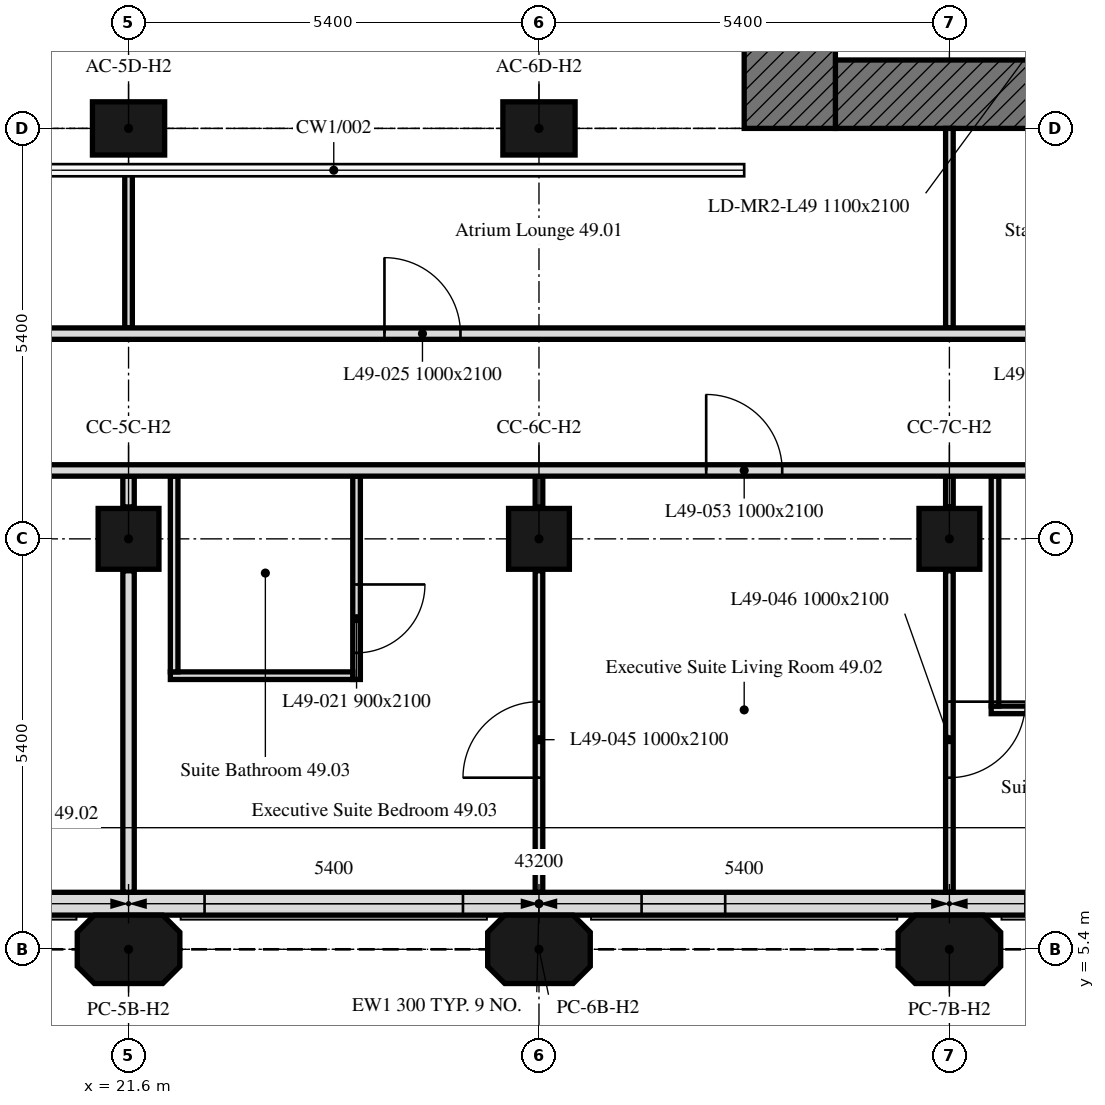
"""IFC4 building model, lengths in metres.
Left out: names, types, materials, properties, quantities, classifications, styles, units other than length and angle.
Written with IfcOpenShell. Run it as: python <this file> out.ifc"""

import sys

from ifc_helpers import new_model, si_unit, direction, frame, frame_2d, origin, origin_2d, place, context, subcontext, project, spatial, polyline, rectangle, outline, extrude, element, fill, save


model = new_model("IFC4")
c1 = context("Model", 3, precision=1e-05, world=origin(), true_north=direction((0.0, 1.0)))
c2 = subcontext(c1, "Body", "Model", "MODEL_VIEW")
j1 = project(units=[si_unit("LENGTHUNIT", "METRE"), si_unit("PLANEANGLEUNIT", "RADIAN")], contexts=[c1])
p1 = place(None, origin())
s1 = spatial("IfcSite", under=j1, at=p1, CompositionType="ELEMENT")
p2 = place(p1, origin())
s2 = spatial("IfcBuilding", under=s1, at=p2, CompositionType="ELEMENT")
p3 = place(p2, frame((0.0, 0.0, 200.5)))
s3 = spatial("IfcBuildingStorey", under=s2, at=p3, CompositionType="ELEMENT", Elevation=200.5)
for number, where, z_axis, x_axis in (
    (1, (21.6, 5.4, 0.0), (0.0, 0.0, 1.0), (1.0, 0.0, 0.0)),
    (2, (27.0, 5.4, 0.0), (0.0, 0.0, 1.0), (1.0, 0.0, 0.0)),
    (3, (32.4, 5.4, 0.0), (0.0, 0.0, 1.0), (1.0, 0.0, 0.0)),
):
    element("IfcColumn", number, at=place(p3, frame(where, z_axis=z_axis, x_axis=x_axis)), inside=s3, PredefinedType="COLUMN", context=c2, shape_type="SweptSolid", body=[
        extrude(outline(polyline([(-0.45, -0.45), (0.45, -0.45), (0.675, -0.225), (0.675, 0.225), (0.45, 0.45), (-0.45, 0.45), (-0.675, 0.225), (-0.675, -0.225), (-0.45, -0.45)])), origin(), (0.0, 0.0, 1.0), 3.0),
    ])
for number, where, z_axis, x_axis in (
    (4, (21.6, 10.8, 0.0), (0.0, 0.0, 1.0), (1.0, 0.0, 0.0)),
    (5, (27.0, 10.8, 0.0), (0.0, 0.0, 1.0), (1.0, 0.0, 0.0)),
    (6, (32.4, 10.8, 0.0), (0.0, 0.0, 1.0), (1.0, 0.0, 0.0)),
):
    element("IfcColumn", number, at=place(p3, frame(where, z_axis=z_axis, x_axis=x_axis)), inside=s3, PredefinedType="COLUMN", context=c2, shape_type="SweptSolid", body=[
        extrude(rectangle(XDim=0.8, YDim=0.8, at=origin_2d()), origin(), (0.0, 0.0, 1.0), 3.0),
    ])
for number, where, z_axis, x_axis in (
    (7, (21.6, 16.2, 0.0), (0.0, 0.0, 1.0), (1.0, 0.0, 0.0)),
    (8, (27.0, 16.2, 0.0), (0.0, 0.0, 1.0), (1.0, 0.0, 0.0)),
):
    element("IfcColumn", number, at=place(p3, frame(where, z_axis=z_axis, x_axis=x_axis)), inside=s3, PredefinedType="COLUMN", context=c2, shape_type="SweptSolid", body=[
        extrude(rectangle(XDim=0.95, YDim=0.7, at=origin_2d()), origin(), (0.0, 0.0, 1.0), 3.0),
    ])
p4 = place(p3, frame((10.986, 6.0, 0.0), z_axis=(0.0, 0.0, 1.0), x_axis=(1.0, 0.0, 0.0)))
e9 = element("IfcWall", 9, at=p4, inside=s3, PredefinedType="SOLIDWALL", context=c2, shape_type="SweptSolid", body=[
    extrude(rectangle(XDim=32.027, YDim=0.3, at=frame_2d((16.014, 0.0))), origin(), (0.0, 0.0, 1.0), 3.0),
])
p5 = place(p4, frame((0.814, 0.0, 0.9)))
e10 = element("IfcOpeningElement", 10, at=p5, cuts=e9, PredefinedType="OPENING", context=c2, shape_type="SweptSolid", body=[
    extrude(rectangle(XDim=3.4, YDim=1.7, at=frame_2d((1.7, 0.85))), frame((0.0, 0.16, 0.0), z_axis=(0.0, -1.0, 0.0), x_axis=(1.0, 0.0, 0.0)), (0.0, 0.0, 1.0), 0.32),
])
p6 = place(p4, frame((6.564, 0.0, 0.9)))
e11 = element("IfcOpeningElement", 11, at=p6, cuts=e9, PredefinedType="OPENING", context=c2, shape_type="SweptSolid", body=[
    extrude(rectangle(XDim=1.1, YDim=1.7, at=frame_2d((0.55, 0.85))), frame((0.0, 0.16, 0.0), z_axis=(0.0, -1.0, 0.0), x_axis=(1.0, 0.0, 0.0)), (0.0, 0.0, 1.0), 0.32),
])
p7 = place(p4, frame((11.614, 0.0, 0.9)))
e12 = element("IfcOpeningElement", 12, at=p7, cuts=e9, PredefinedType="OPENING", context=c2, shape_type="SweptSolid", body=[
    extrude(rectangle(XDim=3.4, YDim=1.7, at=frame_2d((1.7, 0.85))), frame((0.0, 0.16, 0.0), z_axis=(0.0, -1.0, 0.0), x_axis=(1.0, 0.0, 0.0)), (0.0, 0.0, 1.0), 0.32),
])
p8 = place(p4, frame((17.364, 0.0, 0.9)))
e13 = element("IfcOpeningElement", 13, at=p8, cuts=e9, PredefinedType="OPENING", context=c2, shape_type="SweptSolid", body=[
    extrude(rectangle(XDim=1.1, YDim=1.7, at=frame_2d((0.55, 0.85))), frame((0.0, 0.16, 0.0), z_axis=(0.0, -1.0, 0.0), x_axis=(1.0, 0.0, 0.0)), (0.0, 0.0, 1.0), 0.32),
])
p9 = place(p4, frame((22.414, 0.0, 0.9)))
e14 = element("IfcOpeningElement", 14, at=p9, cuts=e9, PredefinedType="OPENING", context=c2, shape_type="SweptSolid", body=[
    extrude(rectangle(XDim=3.4, YDim=1.7, at=frame_2d((1.7, 0.85))), frame((0.0, 0.16, 0.0), z_axis=(0.0, -1.0, 0.0), x_axis=(1.0, 0.0, 0.0)), (0.0, 0.0, 1.0), 0.32),
])
p10 = place(p4, frame((28.164, 0.0, 0.9)))
e15 = element("IfcOpeningElement", 15, at=p10, cuts=e9, PredefinedType="OPENING", context=c2, shape_type="SweptSolid", body=[
    extrude(rectangle(XDim=1.1, YDim=1.7, at=frame_2d((0.55, 0.85))), frame((0.0, 0.16, 0.0), z_axis=(0.0, -1.0, 0.0), x_axis=(1.0, 0.0, 0.0)), (0.0, 0.0, 1.0), 0.32),
])
p11 = place(p3, frame((42.0, 16.65, 0.0), z_axis=(0.0, 0.0, 1.0), x_axis=(-1.0, 0.0, 0.0)))
e16 = element("IfcWall", 16, at=p11, inside=s3, PredefinedType="SOLIDWALL", context=c2, shape_type="SweptSolid", body=[
    extrude(rectangle(XDim=11.1, YDim=0.9, at=frame_2d((5.55, 0.0))), origin(), (0.0, 0.0, 1.0), 3.0),
])
p12 = place(p11, frame((3.55, 0.0, 0.0)))
e17 = element("IfcOpeningElement", 17, at=p12, cuts=e16, PredefinedType="OPENING", context=c2, shape_type="SweptSolid", body=[
    extrude(rectangle(XDim=2.0, YDim=2.4, at=frame_2d((1.0, 1.2))), frame((0.0, 0.45, 0.0), z_axis=(0.0, -1.0, 0.0), x_axis=(1.0, 0.0, 0.0)), (0.0, 0.0, 1.0), 0.9),
])
p13 = place(p3, frame((30.3, 16.2, 0.0), z_axis=(0.0, 0.0, 1.0), x_axis=(0.0, 1.0, 0.0)))
e18 = element("IfcWall", 18, at=p13, inside=s3, PredefinedType="SOLIDWALL", context=c2, shape_type="SweptSolid", body=[
    extrude(rectangle(XDim=16.2, YDim=1.2, at=frame_2d((8.1, 0.0))), origin(), (0.0, 0.0, 1.0), 3.0),
])
p14 = place(p3, frame((21.6, 6.151, 0.0), z_axis=(0.0, 0.0, 1.0), x_axis=(0.0, 1.0, 0.0)))
e19 = element("IfcWall", 19, at=p14, inside=s3, PredefinedType="PARTITIONING", context=c2, shape_type="SweptSolid", body=[
    extrude(rectangle(XDim=4.229, YDim=0.15, at=frame_2d((2.115, 0.0))), origin(), (0.0, 0.0, 1.0), 3.0),
])
p15 = place(p3, frame((21.6, 11.22, 0.0), z_axis=(0.0, 0.0, 1.0), x_axis=(0.0, 1.0, 0.0)))
e20 = element("IfcWall", 20, at=p15, inside=s3, PredefinedType="PARTITIONING", context=c2, shape_type="SweptSolid", body=[
    extrude(rectangle(XDim=0.405, YDim=0.15, at=frame_2d((0.203, 0.0))), origin(), (0.0, 0.0, 1.0), 3.0),
])
p16 = place(p3, frame((27.0, 6.151, 0.0), z_axis=(0.0, 0.0, 1.0), x_axis=(0.0, 1.0, 0.0)))
e21 = element("IfcWall", 21, at=p16, inside=s3, PredefinedType="PARTITIONING", context=c2, shape_type="SweptSolid", body=[
    extrude(rectangle(XDim=4.229, YDim=0.1, at=frame_2d((2.115, 0.0))), origin(), (0.0, 0.0, 1.0), 3.0),
])
p17 = place(p16, frame((1.507, 0.0, 0.0)))
e22 = element("IfcOpeningElement", 22, at=p17, cuts=e21, PredefinedType="OPENING", context=c2, shape_type="SweptSolid", body=[
    extrude(rectangle(XDim=1.0, YDim=2.1, at=frame_2d((0.5, 1.05))), frame((0.0, 0.05, 0.0), z_axis=(0.0, -1.0, 0.0), x_axis=(1.0, 0.0, 0.0)), (0.0, 0.0, 1.0), 0.1),
])
p18 = place(p3, frame((27.0, 11.22, 0.0), z_axis=(0.0, 0.0, 1.0), x_axis=(0.0, 1.0, 0.0)))
e23 = element("IfcWall", 23, at=p18, inside=s3, PredefinedType="PARTITIONING", context=c2, shape_type="SweptSolid", body=[
    extrude(rectangle(XDim=0.405, YDim=0.1, at=frame_2d((0.203, 0.0))), origin(), (0.0, 0.0, 1.0), 3.0),
])
p19 = place(p3, frame((24.6, 11.625, 0.0), z_axis=(0.0, 0.0, 1.0), x_axis=(0.0, -1.0, 0.0)))
e24 = element("IfcWall", 24, at=p19, inside=s3, PredefinedType="PARTITIONING", context=c2, shape_type="SweptSolid", body=[
    extrude(rectangle(XDim=2.675, YDim=0.1, at=frame_2d((1.337, 0.0))), origin(), (0.0, 0.0, 1.0), 3.0),
])
p20 = place(p19, frame((1.425, 0.0, 0.0)))
e25 = element("IfcOpeningElement", 25, at=p20, cuts=e24, PredefinedType="OPENING", context=c2, shape_type="SweptSolid", body=[
    extrude(rectangle(XDim=0.9, YDim=2.1, at=frame_2d((0.45, 1.05))), frame((0.0, 0.05, 0.0), z_axis=(0.0, -1.0, 0.0), x_axis=(1.0, 0.0, 0.0)), (0.0, 0.0, 1.0), 0.1),
])
p21 = place(p3, frame((24.55, 9.0, 0.0), z_axis=(0.0, 0.0, 1.0), x_axis=(-1.0, 0.0, 0.0)))
e26 = element("IfcWall", 26, at=p21, inside=s3, PredefinedType="PARTITIONING", context=c2, shape_type="SweptSolid", body=[
    extrude(rectangle(XDim=2.4, YDim=0.1, at=frame_2d((1.2, 0.0))), origin(), (0.0, 0.0, 1.0), 3.0),
])
p22 = place(p3, frame((22.2, 9.05, 0.0), z_axis=(0.0, 0.0, 1.0), x_axis=(0.0, 1.0, 0.0)))
e27 = element("IfcWall", 27, at=p22, inside=s3, PredefinedType="PARTITIONING", context=c2, shape_type="SweptSolid", body=[
    extrude(rectangle(XDim=2.575, YDim=0.1, at=frame_2d((1.288, 0.0))), origin(), (0.0, 0.0, 1.0), 3.0),
])
p23 = place(p3, frame((35.35, 8.55, 0.0), z_axis=(0.0, 0.0, 1.0), x_axis=(-1.0, 0.0, 0.0)))
e28 = element("IfcWall", 28, at=p23, inside=s3, PredefinedType="PARTITIONING", context=c2, shape_type="SweptSolid", body=[
    extrude(rectangle(XDim=2.4, YDim=0.1, at=frame_2d((1.2, 0.0))), origin(), (0.0, 0.0, 1.0), 3.0),
])
p24 = place(p3, frame((33.0, 8.6, 0.0), z_axis=(0.0, 0.0, 1.0), x_axis=(0.0, 1.0, 0.0)))
e29 = element("IfcWall", 29, at=p24, inside=s3, PredefinedType="PARTITIONING", context=c2, shape_type="SweptSolid", body=[
    extrude(rectangle(XDim=3.025, YDim=0.1, at=frame_2d((1.512, 0.0))), origin(), (0.0, 0.0, 1.0), 3.0),
])
p25 = place(p3, frame((32.4, 11.625, 0.0), z_axis=(0.0, 0.0, 1.0), x_axis=(0.0, -1.0, 0.0)))
e30 = element("IfcWall", 30, at=p25, inside=s3, PredefinedType="PARTITIONING", context=c2, shape_type="SweptSolid", body=[
    extrude(rectangle(XDim=0.405, YDim=0.1, at=frame_2d((0.203, 0.0))), origin(), (0.0, 0.0, 1.0), 3.0),
])
p26 = place(p3, frame((32.4, 10.38, 0.0), z_axis=(0.0, 0.0, 1.0), x_axis=(0.0, -1.0, 0.0)))
e31 = element("IfcWall", 31, at=p26, inside=s3, PredefinedType="PARTITIONING", context=c2, shape_type="SweptSolid", body=[
    extrude(rectangle(XDim=4.229, YDim=0.1, at=frame_2d((2.115, 0.0))), origin(), (0.0, 0.0, 1.0), 3.0),
])
p27 = place(p26, frame((1.722, 0.0, 0.0)))
e32 = element("IfcOpeningElement", 32, at=p27, cuts=e31, PredefinedType="OPENING", context=c2, shape_type="SweptSolid", body=[
    extrude(rectangle(XDim=1.0, YDim=2.1, at=frame_2d((0.5, 1.05))), frame((0.0, 0.05, 0.0), z_axis=(0.0, -1.0, 0.0), x_axis=(1.0, 0.0, 0.0)), (0.0, 0.0, 1.0), 0.1),
])
p28 = place(p3, frame((6.151, 11.7, 0.0), z_axis=(0.0, 0.0, 1.0), x_axis=(1.0, 0.0, 0.0)))
e33 = element("IfcWall", 33, at=p28, inside=s3, PredefinedType="PARTITIONING", context=c2, shape_type="SweptSolid", body=[
    extrude(rectangle(XDim=41.698, YDim=0.15, at=frame_2d((20.849, 0.0))), origin(), (0.0, 0.0, 1.0), 3.0),
])
p29 = place(p28, frame((37.954, 0.0, 0.0)))
e34 = element("IfcOpeningElement", 34, at=p29, cuts=e33, PredefinedType="OPENING", context=c2, shape_type="SweptSolid", body=[
    extrude(rectangle(XDim=1.0, YDim=2.1, at=frame_2d((0.5, 1.05))), frame((0.0, 0.075, 0.0), z_axis=(0.0, -1.0, 0.0), x_axis=(1.0, 0.0, 0.0)), (0.0, 0.0, 1.0), 0.15),
])
p30 = place(p28, frame((6.849, 0.0, 0.0)))
e35 = element("IfcOpeningElement", 35, at=p30, cuts=e33, PredefinedType="OPENING", context=c2, shape_type="SweptSolid", body=[
    extrude(rectangle(XDim=1.0, YDim=2.1, at=frame_2d((0.5, 1.05))), frame((0.0, 0.075, 0.0), z_axis=(0.0, -1.0, 0.0), x_axis=(1.0, 0.0, 0.0)), (0.0, 0.0, 1.0), 0.15),
])
p31 = place(p28, frame((23.049, 0.0, 0.0)))
e36 = element("IfcOpeningElement", 36, at=p31, cuts=e33, PredefinedType="OPENING", context=c2, shape_type="SweptSolid", body=[
    extrude(rectangle(XDim=1.0, YDim=2.1, at=frame_2d((0.5, 1.05))), frame((0.0, 0.075, 0.0), z_axis=(0.0, -1.0, 0.0), x_axis=(1.0, 0.0, 0.0)), (0.0, 0.0, 1.0), 0.15),
])
p32 = place(p3, frame((21.6, 13.575, 0.0), z_axis=(0.0, 0.0, 1.0), x_axis=(0.0, 1.0, 0.0)))
e37 = element("IfcWall", 37, at=p32, inside=s3, PredefinedType="PARTITIONING", context=c2, shape_type="SweptSolid", body=[
    extrude(rectangle(XDim=2.13, YDim=0.1, at=frame_2d((1.065, 0.0))), origin(), (0.0, 0.0, 1.0), 3.0),
])
p33 = place(p3, frame((32.4, 13.575, 0.0), z_axis=(0.0, 0.0, 1.0), x_axis=(0.0, 1.0, 0.0)))
e38 = element("IfcWall", 38, at=p33, inside=s3, PredefinedType="PARTITIONING", context=c2, shape_type="SweptSolid", body=[
    extrude(rectangle(XDim=2.625, YDim=0.1, at=frame_2d((1.312, 0.0))), origin(), (0.0, 0.0, 1.0), 3.0),
])
p34 = place(p3, frame((6.151, 13.5, 0.0), z_axis=(0.0, 0.0, 1.0), x_axis=(1.0, 0.0, 0.0)))
e39 = element("IfcWall", 39, at=p34, inside=s3, PredefinedType="PARTITIONING", context=c2, shape_type="SweptSolid", body=[
    extrude(rectangle(XDim=36.974, YDim=0.15, at=frame_2d((18.487, 0.0))), origin(), (0.0, 0.0, 1.0), 3.0),
])
p35 = place(p34, frame((12.249, 0.0, 0.0)))
e40 = element("IfcOpeningElement", 40, at=p35, cuts=e39, PredefinedType="OPENING", context=c2, shape_type="SweptSolid", body=[
    extrude(rectangle(XDim=1.0, YDim=2.1, at=frame_2d((0.5, 1.05))), frame((0.0, 0.075, 0.0), z_axis=(0.0, -1.0, 0.0), x_axis=(1.0, 0.0, 0.0)), (0.0, 0.0, 1.0), 0.15),
])
p36 = place(p34, frame((18.816, 0.0, 0.0)))
e41 = element("IfcOpeningElement", 41, at=p36, cuts=e39, PredefinedType="OPENING", context=c2, shape_type="SweptSolid", body=[
    extrude(rectangle(XDim=1.0, YDim=2.1, at=frame_2d((0.5, 1.05))), frame((0.0, 0.075, 0.0), z_axis=(0.0, -1.0, 0.0), x_axis=(1.0, 0.0, 0.0)), (0.0, 0.0, 1.0), 0.15),
])
p37 = place(p34, frame((2.029, 0.0, 0.0)))
e42 = element("IfcOpeningElement", 42, at=p37, cuts=e39, PredefinedType="OPENING", context=c2, shape_type="SweptSolid", body=[
    extrude(rectangle(XDim=1.0, YDim=2.1, at=frame_2d((0.5, 1.05))), frame((0.0, 0.075, 0.0), z_axis=(0.0, -1.0, 0.0), x_axis=(1.0, 0.0, 0.0)), (0.0, 0.0, 1.0), 0.15),
])
p38 = place(p34, frame((27.374, 0.0, 0.0)))
e43 = element("IfcOpeningElement", 43, at=p38, cuts=e39, PredefinedType="OPENING", context=c2, shape_type="SweptSolid", body=[
    extrude(rectangle(XDim=1.0, YDim=2.1, at=frame_2d((0.5, 1.05))), frame((0.0, 0.075, 0.0), z_axis=(0.0, -1.0, 0.0), x_axis=(1.0, 0.0, 0.0)), (0.0, 0.0, 1.0), 0.15),
])
p39 = place(p34, frame((34.574, 0.0, 0.0)))
e44 = element("IfcOpeningElement", 44, at=p39, cuts=e39, PredefinedType="OPENING", context=c2, shape_type="SweptSolid", body=[
    extrude(rectangle(XDim=1.0, YDim=2.1, at=frame_2d((0.5, 1.05))), frame((0.0, 0.075, 0.0), z_axis=(0.0, -1.0, 0.0), x_axis=(1.0, 0.0, 0.0)), (0.0, 0.0, 1.0), 0.15),
])
p40 = place(p34, frame((7.924, 0.0, 0.0)))
e45 = element("IfcOpeningElement", 45, at=p40, cuts=e39, PredefinedType="OPENING", context=c2, shape_type="SweptSolid", body=[
    extrude(rectangle(XDim=1.0, YDim=2.1, at=frame_2d((0.5, 1.05))), frame((0.0, 0.075, 0.0), z_axis=(0.0, -1.0, 0.0), x_axis=(1.0, 0.0, 0.0)), (0.0, 0.0, 1.0), 0.15),
])
p41 = place(p34, frame((4.699, 0.0, 0.0)))
e46 = element("IfcOpeningElement", 46, at=p41, cuts=e39, PredefinedType="OPENING", context=c2, shape_type="SweptSolid", body=[
    extrude(rectangle(XDim=1.8, YDim=2.4, at=frame_2d((0.9, 1.2))), frame((0.0, 0.075, 0.0), z_axis=(0.0, -1.0, 0.0), x_axis=(1.0, 0.0, 0.0)), (0.0, 0.0, 1.0), 0.15),
])
p42 = place(p34, frame((29.799, 0.0, 0.0)))
e47 = element("IfcOpeningElement", 47, at=p42, cuts=e39, PredefinedType="OPENING", context=c2, shape_type="SweptSolid", body=[
    extrude(rectangle(XDim=1.8, YDim=2.4, at=frame_2d((0.9, 1.2))), frame((0.0, 0.075, 0.0), z_axis=(0.0, -1.0, 0.0), x_axis=(1.0, 0.0, 0.0)), (0.0, 0.0, 1.0), 0.15),
])
p43 = place(p7, origin())
e48 = element("IfcWindow", 48, at=p43, inside=s3, PartitioningType="SINGLE_PANEL", PredefinedType="WINDOW", context=c2, shape_type="SweptSolid", body=[
    extrude(rectangle(XDim=3.4, YDim=1.7, at=frame_2d((1.7, 0.85))), frame((0.0, 0.03, 0.0), z_axis=(0.0, -1.0, 0.0), x_axis=(1.0, 0.0, 0.0)), (0.0, 0.0, 1.0), 0.06),
])
fill(e12, e48)
p44 = place(p8, origin())
e49 = element("IfcWindow", 49, at=p44, inside=s3, PartitioningType="SINGLE_PANEL", PredefinedType="WINDOW", context=c2, shape_type="SweptSolid", body=[
    extrude(rectangle(XDim=1.1, YDim=1.7, at=frame_2d((0.55, 0.85))), frame((0.0, 0.03, 0.0), z_axis=(0.0, -1.0, 0.0), x_axis=(1.0, 0.0, 0.0)), (0.0, 0.0, 1.0), 0.06),
])
fill(e13, e49)
p45 = place(p20, origin())
e50 = element("IfcDoor", 50, at=p45, inside=s3, OperationType="SINGLE_SWING_LEFT", PredefinedType="DOOR", context=c2, shape_type="SweptSolid", body=[
    extrude(rectangle(XDim=0.9, YDim=2.1, at=frame_2d((0.45, 1.05))), frame((0.0, 0.025, 0.0), z_axis=(0.0, -1.0, 0.0), x_axis=(1.0, 0.0, 0.0)), (0.0, 0.0, 1.0), 0.05),
])
fill(e25, e50)
p46 = place(p36, origin())
e51 = element("IfcDoor", 51, at=p46, inside=s3, OperationType="SINGLE_SWING_RIGHT", PredefinedType="DOOR", context=c2, shape_type="SweptSolid", body=[
    extrude(rectangle(XDim=1.0, YDim=2.1, at=frame_2d((0.5, 1.05))), frame((0.0, 0.025, 0.0), z_axis=(0.0, -1.0, 0.0), x_axis=(1.0, 0.0, 0.0)), (0.0, 0.0, 1.0), 0.05),
])
fill(e41, e51)
p47 = place(p17, origin())
e52 = element("IfcDoor", 52, at=p47, inside=s3, OperationType="SINGLE_SWING_LEFT", PredefinedType="DOOR", context=c2, shape_type="SweptSolid", body=[
    extrude(rectangle(XDim=1.0, YDim=2.1, at=frame_2d((0.5, 1.05))), frame((0.0, 0.025, 0.0), z_axis=(0.0, -1.0, 0.0), x_axis=(1.0, 0.0, 0.0)), (0.0, 0.0, 1.0), 0.05),
])
fill(e22, e52)
p48 = place(p27, origin())
e53 = element("IfcDoor", 53, at=p48, inside=s3, OperationType="SINGLE_SWING_LEFT", PredefinedType="DOOR", context=c2, shape_type="SweptSolid", body=[
    extrude(rectangle(XDim=1.0, YDim=2.1, at=frame_2d((0.5, 1.05))), frame((0.0, 0.025, 0.0), z_axis=(0.0, -1.0, 0.0), x_axis=(1.0, 0.0, 0.0)), (0.0, 0.0, 1.0), 0.05),
])
fill(e32, e53)
p49 = place(p31, origin())
e54 = element("IfcDoor", 54, at=p49, inside=s3, OperationType="SINGLE_SWING_LEFT", PredefinedType="DOOR", context=c2, shape_type="SweptSolid", body=[
    extrude(rectangle(XDim=1.0, YDim=2.1, at=frame_2d((0.5, 1.05))), frame((0.0, 0.025, 0.0), z_axis=(0.0, -1.0, 0.0), x_axis=(1.0, 0.0, 0.0)), (0.0, 0.0, 1.0), 0.05),
])
fill(e36, e54)
save(model, sys.argv[1])
